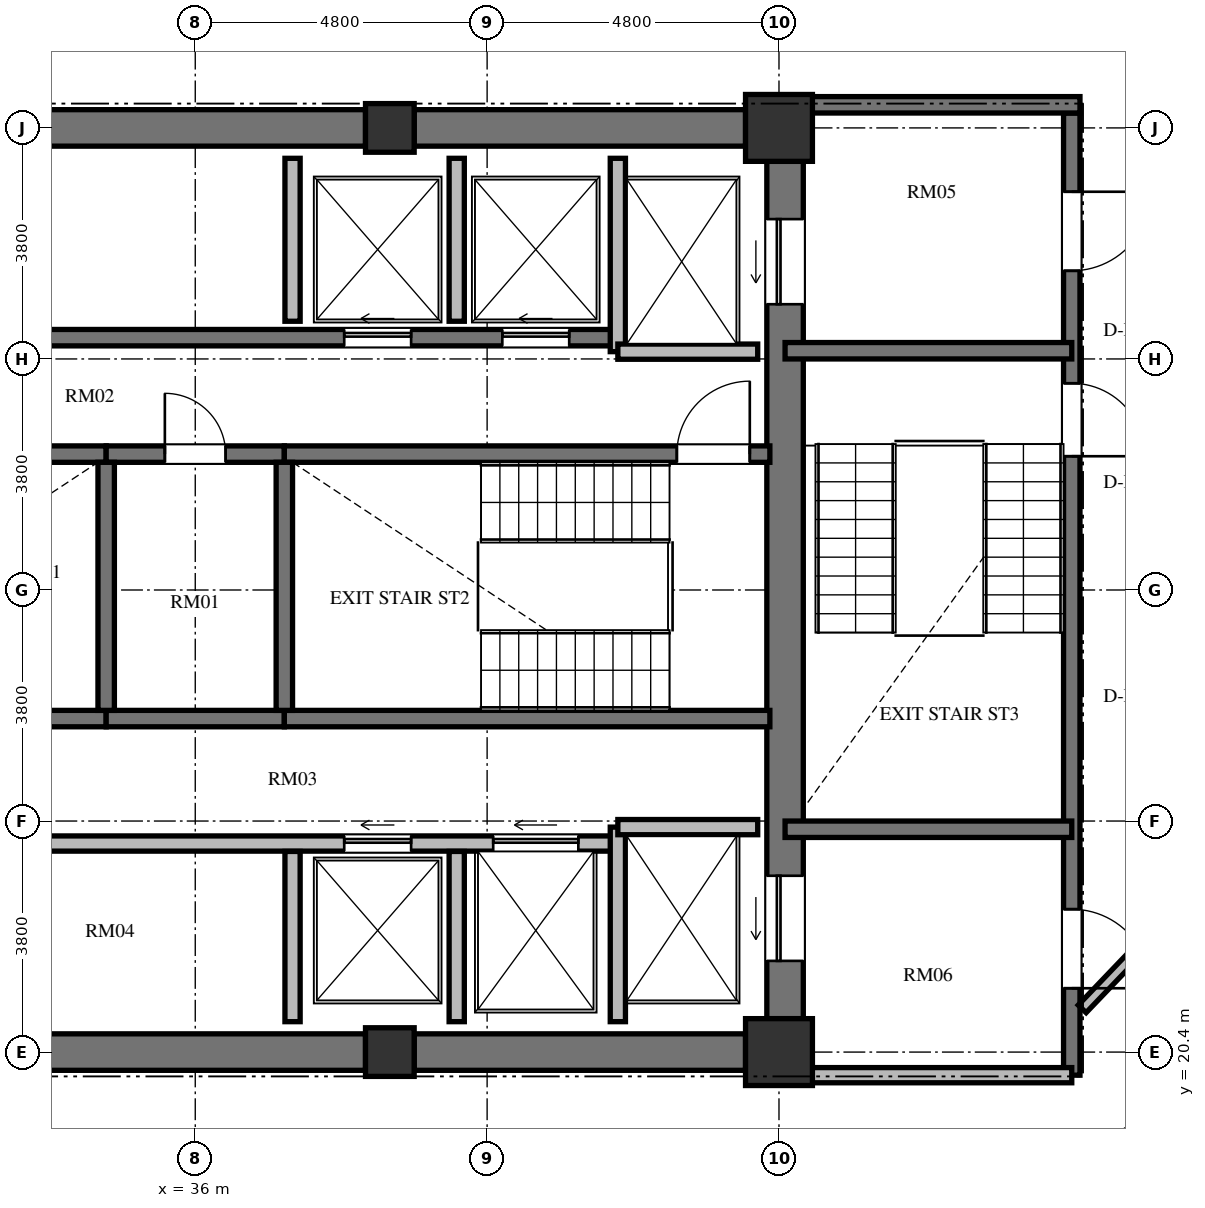
"""IFC4 building model, lengths in metres.
Left out: names, types, materials, properties, quantities, classifications, styles, units other than length and angle.
Written with IfcOpenShell. Run it as: python <this file> out.ifc"""

import sys

from ifc_helpers import new_model, si_unit, direction, frame, frame_2d, origin, origin_2d, place, context, subcontext, project, spatial, rectangle, extrude, element, fill, save


model = new_model("IFC4")
c1 = context("Model", 3, precision=1e-05, world=origin(), true_north=direction((0.0, 1.0)))
c2 = subcontext(c1, "Body", "Model", "MODEL_VIEW")
j1 = project(units=[si_unit("LENGTHUNIT", "METRE"), si_unit("PLANEANGLEUNIT", "RADIAN")], contexts=[c1])
p1 = place(None, origin())
s1 = spatial("IfcSite", under=j1, at=p1, CompositionType="ELEMENT")
p2 = place(p1, origin())
s2 = spatial("IfcBuilding", under=s1, at=p2, CompositionType="ELEMENT")
p3 = place(p2, frame((0.0, 0.0, 220.368)))
s3 = spatial("IfcBuildingStorey", under=s2, at=p3, CompositionType="ELEMENT", Elevation=220.368)
p4 = place(p3, frame((39.2, 20.4, 0.0), z_axis=(0.0, 0.0, 1.0), x_axis=(1.0, 0.0, 0.0)))
e1 = element("IfcColumn", 1, at=p4, inside=s3, PredefinedType="COLUMN", context=c2, shape_type="SweptSolid", body=[
    extrude(rectangle(XDim=0.8, YDim=0.8, at=origin_2d()), origin(), (0.0, 0.0, 1.0), 3.648),
])
for number, where, z_axis, x_axis in (
    (2, (45.6, 20.4, 0.0), (0.0, 0.0, 1.0), (1.0, 0.0, 0.0)),
    (3, (45.6, 35.6, 0.0), (0.0, 0.0, 1.0), (1.0, 0.0, 0.0)),
):
    element("IfcColumn", number, at=place(p3, frame(where, z_axis=z_axis, x_axis=x_axis)), inside=s3, PredefinedType="COLUMN", context=c2, shape_type="SweptSolid", body=[
        extrude(rectangle(XDim=1.1, YDim=1.1, at=origin_2d()), origin(), (0.0, 0.0, 1.0), 3.648),
    ])
p5 = place(p3, frame((39.2, 35.6, 0.0), z_axis=(0.0, 0.0, 1.0), x_axis=(1.0, 0.0, 0.0)))
e4 = element("IfcColumn", 4, at=p5, inside=s3, PredefinedType="COLUMN", context=c2, shape_type="SweptSolid", body=[
    extrude(rectangle(XDim=0.8, YDim=0.8, at=origin_2d()), origin(), (0.0, 0.0, 1.0), 3.648),
])
p6 = place(p3, frame((45.7, 20.95, 0.0), z_axis=(0.0, 0.0, 1.0), x_axis=(0.0, 1.0, 0.0)))
e5 = element("IfcWall", 5, at=p6, inside=s3, PredefinedType="SHEAR", context=c2, shape_type="SweptSolid", body=[
    extrude(rectangle(XDim=14.1, YDim=0.6, at=frame_2d((7.05, 0.0))), origin(), (0.0, 0.0, 1.0), 3.648),
])
p7 = place(p6, frame((11.75, 0.0, 0.0)))
e6 = element("IfcOpeningElement", 6, at=p7, cuts=e5, PredefinedType="OPENING", context=c2, shape_type="SweptSolid", body=[
    extrude(rectangle(XDim=1.4, YDim=2.3, at=frame_2d((0.7, 1.15))), frame((0.0, 0.31, 0.0), z_axis=(0.0, -1.0, 0.0), x_axis=(1.0, 0.0, 0.0)), (0.0, 0.0, 1.0), 0.62),
])
p8 = place(p6, frame((0.95, 0.0, 0.0)))
e7 = element("IfcOpeningElement", 7, at=p8, cuts=e5, PredefinedType="OPENING", context=c2, shape_type="SweptSolid", body=[
    extrude(rectangle(XDim=1.4, YDim=2.3, at=frame_2d((0.7, 1.15))), frame((0.0, 0.31, 0.0), z_axis=(0.0, -1.0, 0.0), x_axis=(1.0, 0.0, 0.0)), (0.0, 0.0, 1.0), 0.62),
])
for number, where, z_axis, x_axis in (
    (8, (33.2, 20.4, 0.0), (0.0, 0.0, 1.0), (1.0, 0.0, 0.0)),
    (9, (33.2, 35.6, 0.0), (0.0, 0.0, 1.0), (1.0, 0.0, 0.0)),
):
    element("IfcWall", number, at=place(p3, frame(where, z_axis=z_axis, x_axis=x_axis)), inside=s3, PredefinedType="SHEAR", context=c2, shape_type="SweptSolid", body=[
        extrude(rectangle(XDim=5.6, YDim=0.6, at=frame_2d((2.8, 0.0))), origin(), (0.0, 0.0, 1.0), 3.648),
    ])
for number, where, z_axis, x_axis in (
    (10, (39.6, 20.4, 0.0), (0.0, 0.0, 1.0), (1.0, 0.0, 0.0)),
    (11, (39.6, 35.6, 0.0), (0.0, 0.0, 1.0), (1.0, 0.0, 0.0)),
):
    element("IfcWall", number, at=place(p3, frame(where, z_axis=z_axis, x_axis=x_axis)), inside=s3, PredefinedType="SHEAR", context=c2, shape_type="SweptSolid", body=[
        extrude(rectangle(XDim=5.45, YDim=0.6, at=frame_2d((2.725, 0.0))), origin(), (0.0, 0.0, 1.0), 3.648),
    ])
p9 = place(p3, frame((26.55, 30.235, 0.0), z_axis=(0.0, 0.0, 1.0), x_axis=(1.0, 0.0, 0.0)))
e12 = element("IfcWall", 12, at=p9, inside=s3, PredefinedType="SHEAR", context=c2, shape_type="SweptSolid", body=[
    extrude(rectangle(XDim=7.985, YDim=0.27, at=frame_2d((3.992, 0.0))), origin(), (0.0, 0.0, 1.0), 3.648),
])
p10 = place(p3, frame((34.535, 30.235, 0.0), z_axis=(0.0, 0.0, 1.0), x_axis=(1.0, 0.0, 0.0)))
e13 = element("IfcWall", 13, at=p10, inside=s3, PredefinedType="SHEAR", context=c2, shape_type="SweptSolid", body=[
    extrude(rectangle(XDim=2.93, YDim=0.27, at=frame_2d((1.465, 0.0))), origin(), (0.0, 0.0, 1.0), 3.648),
])
p11 = place(p10, frame((0.965, 0.0, 0.0)))
e14 = element("IfcOpeningElement", 14, at=p11, cuts=e13, PredefinedType="OPENING", context=c2, shape_type="SweptSolid", body=[
    extrude(rectangle(XDim=1.0, YDim=2.1, at=frame_2d((0.5, 1.05))), frame((0.0, 0.145, 0.0), z_axis=(0.0, -1.0, 0.0), x_axis=(1.0, 0.0, 0.0)), (0.0, 0.0, 1.0), 0.29),
])
p12 = place(p3, frame((37.465, 30.235, 0.0), z_axis=(0.0, 0.0, 1.0), x_axis=(1.0, 0.0, 0.0)))
e15 = element("IfcWall", 15, at=p12, inside=s3, PredefinedType="SHEAR", context=c2, shape_type="SweptSolid", body=[
    extrude(rectangle(XDim=7.985, YDim=0.27, at=frame_2d((3.992, 0.0))), origin(), (0.0, 0.0, 1.0), 3.648),
])
p13 = place(p12, frame((6.455, 0.0, 0.0)))
e16 = element("IfcOpeningElement", 16, at=p13, cuts=e15, PredefinedType="OPENING", context=c2, shape_type="SweptSolid", body=[
    extrude(rectangle(XDim=1.2, YDim=2.15, at=frame_2d((0.6, 1.075))), frame((0.0, 0.145, 0.0), z_axis=(0.0, -1.0, 0.0), x_axis=(1.0, 0.0, 0.0)), (0.0, 0.0, 1.0), 0.29),
])
p14 = place(p3, frame((26.55, 25.885, 0.0), z_axis=(0.0, 0.0, 1.0), x_axis=(1.0, 0.0, 0.0)))
e17 = element("IfcWall", 17, at=p14, inside=s3, PredefinedType="SHEAR", context=c2, shape_type="SweptSolid", body=[
    extrude(rectangle(XDim=7.985, YDim=0.27, at=frame_2d((3.992, 0.0))), origin(), (0.0, 0.0, 1.0), 3.648),
])
p15 = place(p3, frame((34.535, 25.885, 0.0), z_axis=(0.0, 0.0, 1.0), x_axis=(1.0, 0.0, 0.0)))
e18 = element("IfcWall", 18, at=p15, inside=s3, PredefinedType="SHEAR", context=c2, shape_type="SweptSolid", body=[
    extrude(rectangle(XDim=2.93, YDim=0.27, at=frame_2d((1.465, 0.0))), origin(), (0.0, 0.0, 1.0), 3.648),
])
p16 = place(p3, frame((37.465, 25.885, 0.0), z_axis=(0.0, 0.0, 1.0), x_axis=(1.0, 0.0, 0.0)))
e19 = element("IfcWall", 19, at=p16, inside=s3, PredefinedType="SHEAR", context=c2, shape_type="SweptSolid", body=[
    extrude(rectangle(XDim=7.985, YDim=0.27, at=frame_2d((3.992, 0.0))), origin(), (0.0, 0.0, 1.0), 3.648),
])
for number, where, z_axis, x_axis in (
    (20, (34.535, 26.02, 0.0), (0.0, 0.0, 1.0), (0.0, 1.0, 0.0)),
    (21, (37.465, 26.02, 0.0), (0.0, 0.0, 1.0), (0.0, 1.0, 0.0)),
):
    element("IfcWall", number, at=place(p3, frame(where, z_axis=z_axis, x_axis=x_axis)), inside=s3, PredefinedType="SHEAR", context=c2, shape_type="SweptSolid", body=[
        extrude(rectangle(XDim=4.08, YDim=0.27, at=frame_2d((2.04, 0.0))), origin(), (0.0, 0.0, 1.0), 3.648),
    ])
p17 = place(p3, frame((26.55, 32.15, 0.0), z_axis=(0.0, 0.0, 1.0), x_axis=(1.0, 0.0, 0.0)))
e22 = element("IfcWall", 22, at=p17, inside=s3, PredefinedType="SHEAR", context=c2, shape_type="SweptSolid", body=[
    extrude(rectangle(XDim=16.4, YDim=0.27, at=frame_2d((8.2, 0.0))), origin(), (0.0, 0.0, 1.0), 3.648),
])
p18 = place(p17, frame((5.125, 0.0, 0.0)))
e23 = element("IfcOpeningElement", 23, at=p18, cuts=e22, PredefinedType="OPENING", context=c2, shape_type="SweptSolid", body=[
    extrude(rectangle(XDim=1.05, YDim=2.15, at=frame_2d((0.525, 1.075))), frame((0.0, 0.145, 0.0), z_axis=(0.0, -1.0, 0.0), x_axis=(1.0, 0.0, 0.0)), (0.0, 0.0, 1.0), 0.29),
])
p19 = place(p17, frame((11.9, 0.0, 0.0)))
e24 = element("IfcOpeningElement", 24, at=p19, cuts=e22, PredefinedType="OPENING", context=c2, shape_type="SweptSolid", body=[
    extrude(rectangle(XDim=1.1, YDim=2.2, at=frame_2d((0.55, 1.1))), frame((0.0, 0.145, 0.0), z_axis=(0.0, -1.0, 0.0), x_axis=(1.0, 0.0, 0.0)), (0.0, 0.0, 1.0), 0.29),
])
p20 = place(p17, frame((14.5, 0.0, 0.0)))
e25 = element("IfcOpeningElement", 25, at=p20, cuts=e22, PredefinedType="OPENING", context=c2, shape_type="SweptSolid", body=[
    extrude(rectangle(XDim=1.1, YDim=2.2, at=frame_2d((0.55, 1.1))), frame((0.0, 0.145, 0.0), z_axis=(0.0, -1.0, 0.0), x_axis=(1.0, 0.0, 0.0)), (0.0, 0.0, 1.0), 0.29),
])
p21 = place(p3, frame((26.75, 23.83, 0.0), z_axis=(0.0, 0.0, 1.0), x_axis=(1.0, 0.0, 0.0)))
e26 = element("IfcWall", 26, at=p21, inside=s3, PredefinedType="SOLIDWALL", context=c2, shape_type="SweptSolid", body=[
    extrude(rectangle(XDim=16.2, YDim=0.25, at=frame_2d((8.1, 0.0))), origin(), (0.0, 0.0, 1.0), 3.448),
])
p22 = place(p21, frame((4.75, 0.0, 0.0)))
e27 = element("IfcOpeningElement", 27, at=p22, cuts=e26, PredefinedType="OPENING", context=c2, shape_type="SweptSolid", body=[
    extrude(rectangle(XDim=1.4, YDim=2.2, at=frame_2d((0.7, 1.1))), frame((0.0, 0.135, 0.0), z_axis=(0.0, -1.0, 0.0), x_axis=(1.0, 0.0, 0.0)), (0.0, 0.0, 1.0), 0.27),
])
p23 = place(p21, frame((11.7, 0.0, 0.0)))
e28 = element("IfcOpeningElement", 28, at=p23, cuts=e26, PredefinedType="OPENING", context=c2, shape_type="SweptSolid", body=[
    extrude(rectangle(XDim=1.1, YDim=2.2, at=frame_2d((0.55, 1.1))), frame((0.0, 0.135, 0.0), z_axis=(0.0, -1.0, 0.0), x_axis=(1.0, 0.0, 0.0)), (0.0, 0.0, 1.0), 0.27),
])
p24 = place(p21, frame((14.15, 0.0, 0.0)))
e29 = element("IfcOpeningElement", 29, at=p24, cuts=e26, PredefinedType="OPENING", context=c2, shape_type="SweptSolid", body=[
    extrude(rectangle(XDim=1.4, YDim=2.3, at=frame_2d((0.7, 1.15))), frame((0.0, 0.135, 0.0), z_axis=(0.0, -1.0, 0.0), x_axis=(1.0, 0.0, 0.0)), (0.0, 0.0, 1.0), 0.27),
])
p25 = place(p3, frame((42.95, 31.92, 0.0), z_axis=(0.0, 0.0, 1.0), x_axis=(0.0, 1.0, 0.0)))
e30 = element("IfcWall", 30, at=p25, inside=s3, PredefinedType="SOLIDWALL", context=c2, shape_type="SweptSolid", body=[
    extrude(rectangle(XDim=3.18, YDim=0.25, at=frame_2d((1.59, 0.0))), origin(), (0.0, 0.0, 1.0), 3.448),
])
p26 = place(p3, frame((42.95, 31.92, 0.0), z_axis=(0.0, 0.0, 1.0), x_axis=(1.0, 0.0, 0.0)))
e31 = element("IfcWall", 31, at=p26, inside=s3, PredefinedType="SOLIDWALL", context=c2, shape_type="SweptSolid", body=[
    extrude(rectangle(XDim=2.3, YDim=0.25, at=frame_2d((1.15, 0.0))), origin(), (0.0, 0.0, 1.0), 3.448),
])
p27 = place(p3, frame((42.95, 20.9, 0.0), z_axis=(0.0, 0.0, 1.0), x_axis=(0.0, 1.0, 0.0)))
e32 = element("IfcWall", 32, at=p27, inside=s3, PredefinedType="SOLIDWALL", context=c2, shape_type="SweptSolid", body=[
    extrude(rectangle(XDim=3.2, YDim=0.25, at=frame_2d((1.6, 0.0))), origin(), (0.0, 0.0, 1.0), 3.448),
])
p28 = place(p3, frame((42.95, 24.1, 0.0), z_axis=(0.0, 0.0, 1.0), x_axis=(1.0, 0.0, 0.0)))
e33 = element("IfcWall", 33, at=p28, inside=s3, PredefinedType="SOLIDWALL", context=c2, shape_type="SweptSolid", body=[
    extrude(rectangle(XDim=2.3, YDim=0.25, at=frame_2d((1.15, 0.0))), origin(), (0.0, 0.0, 1.0), 3.448),
])
p29 = place(p3, frame((37.6, 32.42, 0.0), z_axis=(0.0, 0.0, 1.0), x_axis=(0.0, 1.0, 0.0)))
e34 = element("IfcWall", 34, at=p29, inside=s3, PredefinedType="SOLIDWALL", context=c2, shape_type="SweptSolid", body=[
    extrude(rectangle(XDim=2.68, YDim=0.25, at=frame_2d((1.34, 0.0))), origin(), (0.0, 0.0, 1.0), 3.448),
])
p30 = place(p3, frame((37.6, 20.9, 0.0), z_axis=(0.0, 0.0, 1.0), x_axis=(0.0, 1.0, 0.0)))
e35 = element("IfcWall", 35, at=p30, inside=s3, PredefinedType="SOLIDWALL", context=c2, shape_type="SweptSolid", body=[
    extrude(rectangle(XDim=2.8, YDim=0.25, at=frame_2d((1.4, 0.0))), origin(), (0.0, 0.0, 1.0), 3.448),
])
p31 = place(p3, frame((40.3, 32.42, 0.0), z_axis=(0.0, 0.0, 1.0), x_axis=(0.0, 1.0, 0.0)))
e36 = element("IfcWall", 36, at=p31, inside=s3, PredefinedType="SOLIDWALL", context=c2, shape_type="SweptSolid", body=[
    extrude(rectangle(XDim=2.68, YDim=0.25, at=frame_2d((1.34, 0.0))), origin(), (0.0, 0.0, 1.0), 3.448),
])
p32 = place(p3, frame((40.3, 20.9, 0.0), z_axis=(0.0, 0.0, 1.0), x_axis=(0.0, 1.0, 0.0)))
e37 = element("IfcWall", 37, at=p32, inside=s3, PredefinedType="SOLIDWALL", context=c2, shape_type="SweptSolid", body=[
    extrude(rectangle(XDim=2.8, YDim=0.25, at=frame_2d((1.4, 0.0))), origin(), (0.0, 0.0, 1.0), 3.448),
])
p33 = place(p3, frame((50.415, 35.845, 0.0), z_axis=(0.0, 0.0, 1.0), x_axis=(0.0, -1.0, 0.0)))
e38 = element("IfcWall", 38, at=p33, inside=s3, PredefinedType="SHEAR", context=c2, shape_type="SweptSolid", body=[
    extrude(rectangle(XDim=15.825, YDim=0.27, at=frame_2d((7.913, 0.0))), origin(), (0.0, 0.0, 1.0), 3.648),
])
p34 = place(p33, frame((4.445, 0.0, 0.0)))
e39 = element("IfcOpeningElement", 39, at=p34, cuts=e38, PredefinedType="OPENING", context=c2, shape_type="SweptSolid", body=[
    extrude(rectangle(XDim=1.2, YDim=2.15, at=frame_2d((0.6, 1.075))), frame((0.0, 0.145, 0.0), z_axis=(0.0, -1.0, 0.0), x_axis=(1.0, 0.0, 0.0)), (0.0, 0.0, 1.0), 0.29),
])
p35 = place(p33, frame((1.295, 0.0, 0.0)))
e40 = element("IfcOpeningElement", 40, at=p35, cuts=e38, PredefinedType="OPENING", context=c2, shape_type="SweptSolid", body=[
    extrude(rectangle(XDim=1.3, YDim=2.2, at=frame_2d((0.65, 1.1))), frame((0.0, 0.145, 0.0), z_axis=(0.0, -1.0, 0.0), x_axis=(1.0, 0.0, 0.0)), (0.0, 0.0, 1.0), 0.29),
])
p36 = place(p33, frame((13.095, 0.0, 0.0)))
e41 = element("IfcOpeningElement", 41, at=p36, cuts=e38, PredefinedType="OPENING", context=c2, shape_type="SweptSolid", body=[
    extrude(rectangle(XDim=1.3, YDim=2.2, at=frame_2d((0.65, 1.1))), frame((0.0, 0.145, 0.0), z_axis=(0.0, -1.0, 0.0), x_axis=(1.0, 0.0, 0.0)), (0.0, 0.0, 1.0), 0.29),
])
p37 = place(p3, frame((46.0, 35.98, 0.0), z_axis=(0.0, 0.0, 1.0), x_axis=(1.0, 0.0, 0.0)))
e42 = element("IfcWall", 42, at=p37, inside=s3, PredefinedType="SHEAR", context=c2, shape_type="SweptSolid", body=[
    extrude(rectangle(XDim=4.55, YDim=0.27, at=frame_2d((2.275, 0.0))), origin(), (0.0, 0.0, 1.0), 3.648),
])
for number, where, z_axis, x_axis in (
    (43, (45.7, 31.935, 0.0), (0.0, 0.0, 1.0), (1.0, 0.0, 0.0)),
    (44, (45.7, 24.065, 0.0), (0.0, 0.0, 1.0), (1.0, 0.0, 0.0)),
):
    element("IfcWall", number, at=place(p3, frame(where, z_axis=z_axis, x_axis=x_axis)), inside=s3, PredefinedType="SHEAR", context=c2, shape_type="SweptSolid", body=[
        extrude(rectangle(XDim=4.715, YDim=0.27, at=frame_2d((2.357, 0.0))), origin(), (0.0, 0.0, 1.0), 3.648),
    ])
p38 = place(p3, frame((45.7, 20.02, 0.0), z_axis=(0.0, 0.0, 1.0), x_axis=(1.0, 0.0, 0.0)))
e45 = element("IfcWall", 45, at=p38, inside=s3, PredefinedType="SOLIDWALL", context=c2, shape_type="SweptSolid", body=[
    extrude(rectangle(XDim=4.715, YDim=0.25, at=frame_2d((2.357, 0.0))), origin(), (0.0, 0.0, 1.0), 3.448),
])
p39 = place(p3, frame((53.078, 23.714, 0.0), z_axis=(0.0, 0.0, 1.0), x_axis=(-0.691353379446, -0.722516785085, 0.0)))
e46 = element("IfcWall", 46, at=p39, inside=s3, PredefinedType="PARTITIONING", context=c2, shape_type="SweptSolid", body=[
    extrude(rectangle(XDim=3.604, YDim=0.18, at=frame_2d((1.802, 0.0))), origin(), (0.0, 0.0, 1.0), 3.448),
])
p40 = place(p13, origin())
e47 = element("IfcDoor", 47, at=p40, inside=s3, OperationType="SINGLE_SWING_RIGHT", PredefinedType="DOOR", context=c2, shape_type="SweptSolid", body=[
    extrude(rectangle(XDim=1.2, YDim=2.15, at=frame_2d((0.6, 1.075))), frame((0.0, 0.025, 0.0), z_axis=(0.0, -1.0, 0.0), x_axis=(1.0, 0.0, 0.0)), (0.0, 0.0, 1.0), 0.05),
])
fill(e16, e47)
p41 = place(p11, origin())
e48 = element("IfcDoor", 48, at=p41, inside=s3, OperationType="SINGLE_SWING_LEFT", PredefinedType="DOOR", context=c2, shape_type="SweptSolid", body=[
    extrude(rectangle(XDim=1.0, YDim=2.1, at=frame_2d((0.5, 1.05))), frame((0.0, 0.025, 0.0), z_axis=(0.0, -1.0, 0.0), x_axis=(1.0, 0.0, 0.0)), (0.0, 0.0, 1.0), 0.05),
])
fill(e14, e48)
p42 = place(p19, origin())
e49 = element("IfcDoor", 49, at=p42, inside=s3, OperationType="SLIDING_TO_LEFT", PredefinedType="DOOR", context=c2, shape_type="SweptSolid", body=[
    extrude(rectangle(XDim=1.1, YDim=2.2, at=frame_2d((0.55, 1.1))), frame((0.0, 0.025, 0.0), z_axis=(0.0, -1.0, 0.0), x_axis=(1.0, 0.0, 0.0)), (0.0, 0.0, 1.0), 0.05),
])
fill(e24, e49)
p43 = place(p20, origin())
e50 = element("IfcDoor", 50, at=p43, inside=s3, OperationType="SLIDING_TO_LEFT", PredefinedType="DOOR", context=c2, shape_type="SweptSolid", body=[
    extrude(rectangle(XDim=1.1, YDim=2.2, at=frame_2d((0.55, 1.1))), frame((0.0, 0.025, 0.0), z_axis=(0.0, -1.0, 0.0), x_axis=(1.0, 0.0, 0.0)), (0.0, 0.0, 1.0), 0.05),
])
fill(e25, e50)
p44 = place(p23, origin())
e51 = element("IfcDoor", 51, at=p44, inside=s3, OperationType="SLIDING_TO_LEFT", PredefinedType="DOOR", context=c2, shape_type="SweptSolid", body=[
    extrude(rectangle(XDim=1.1, YDim=2.2, at=frame_2d((0.55, 1.1))), frame((0.0, 0.025, 0.0), z_axis=(0.0, -1.0, 0.0), x_axis=(1.0, 0.0, 0.0)), (0.0, 0.0, 1.0), 0.05),
])
fill(e28, e51)
p45 = place(p7, origin())
e52 = element("IfcDoor", 52, at=p45, inside=s3, OperationType="SLIDING_TO_LEFT", PredefinedType="DOOR", context=c2, shape_type="SweptSolid", body=[
    extrude(rectangle(XDim=1.4, YDim=2.3, at=frame_2d((0.7, 1.15))), frame((0.0, 0.025, 0.0), z_axis=(0.0, -1.0, 0.0), x_axis=(1.0, 0.0, 0.0)), (0.0, 0.0, 1.0), 0.05),
])
fill(e6, e52)
p46 = place(p8, origin())
e53 = element("IfcDoor", 53, at=p46, inside=s3, OperationType="SLIDING_TO_LEFT", PredefinedType="DOOR", context=c2, shape_type="SweptSolid", body=[
    extrude(rectangle(XDim=1.4, YDim=2.3, at=frame_2d((0.7, 1.15))), frame((0.0, 0.025, 0.0), z_axis=(0.0, -1.0, 0.0), x_axis=(1.0, 0.0, 0.0)), (0.0, 0.0, 1.0), 0.05),
])
fill(e7, e53)
p47 = place(p24, origin())
e54 = element("IfcDoor", 54, at=p47, inside=s3, OperationType="SLIDING_TO_LEFT", PredefinedType="DOOR", context=c2, shape_type="SweptSolid", body=[
    extrude(rectangle(XDim=1.4, YDim=2.3, at=frame_2d((0.7, 1.15))), frame((0.0, 0.025, 0.0), z_axis=(0.0, -1.0, 0.0), x_axis=(1.0, 0.0, 0.0)), (0.0, 0.0, 1.0), 0.05),
])
fill(e29, e54)
p48 = place(p34, origin())
e55 = element("IfcDoor", 55, at=p48, inside=s3, OperationType="SINGLE_SWING_RIGHT", PredefinedType="DOOR", context=c2, shape_type="SweptSolid", body=[
    extrude(rectangle(XDim=1.2, YDim=2.15, at=frame_2d((0.6, 1.075))), frame((0.0, 0.025, 0.0), z_axis=(0.0, -1.0, 0.0), x_axis=(1.0, 0.0, 0.0)), (0.0, 0.0, 1.0), 0.05),
])
fill(e39, e55)
p49 = place(p35, origin())
e56 = element("IfcDoor", 56, at=p49, inside=s3, OperationType="SINGLE_SWING_LEFT", PredefinedType="DOOR", context=c2, shape_type="SweptSolid", body=[
    extrude(rectangle(XDim=1.3, YDim=2.2, at=frame_2d((0.65, 1.1))), frame((0.0, 0.025, 0.0), z_axis=(0.0, -1.0, 0.0), x_axis=(1.0, 0.0, 0.0)), (0.0, 0.0, 1.0), 0.05),
])
fill(e40, e56)
p50 = place(p36, origin())
e57 = element("IfcDoor", 57, at=p50, inside=s3, OperationType="SINGLE_SWING_RIGHT", PredefinedType="DOOR", context=c2, shape_type="SweptSolid", body=[
    extrude(rectangle(XDim=1.3, YDim=2.2, at=frame_2d((0.65, 1.1))), frame((0.0, 0.025, 0.0), z_axis=(0.0, -1.0, 0.0), x_axis=(1.0, 0.0, 0.0)), (0.0, 0.0, 1.0), 0.05),
])
fill(e41, e57)
save(model, sys.argv[1])
